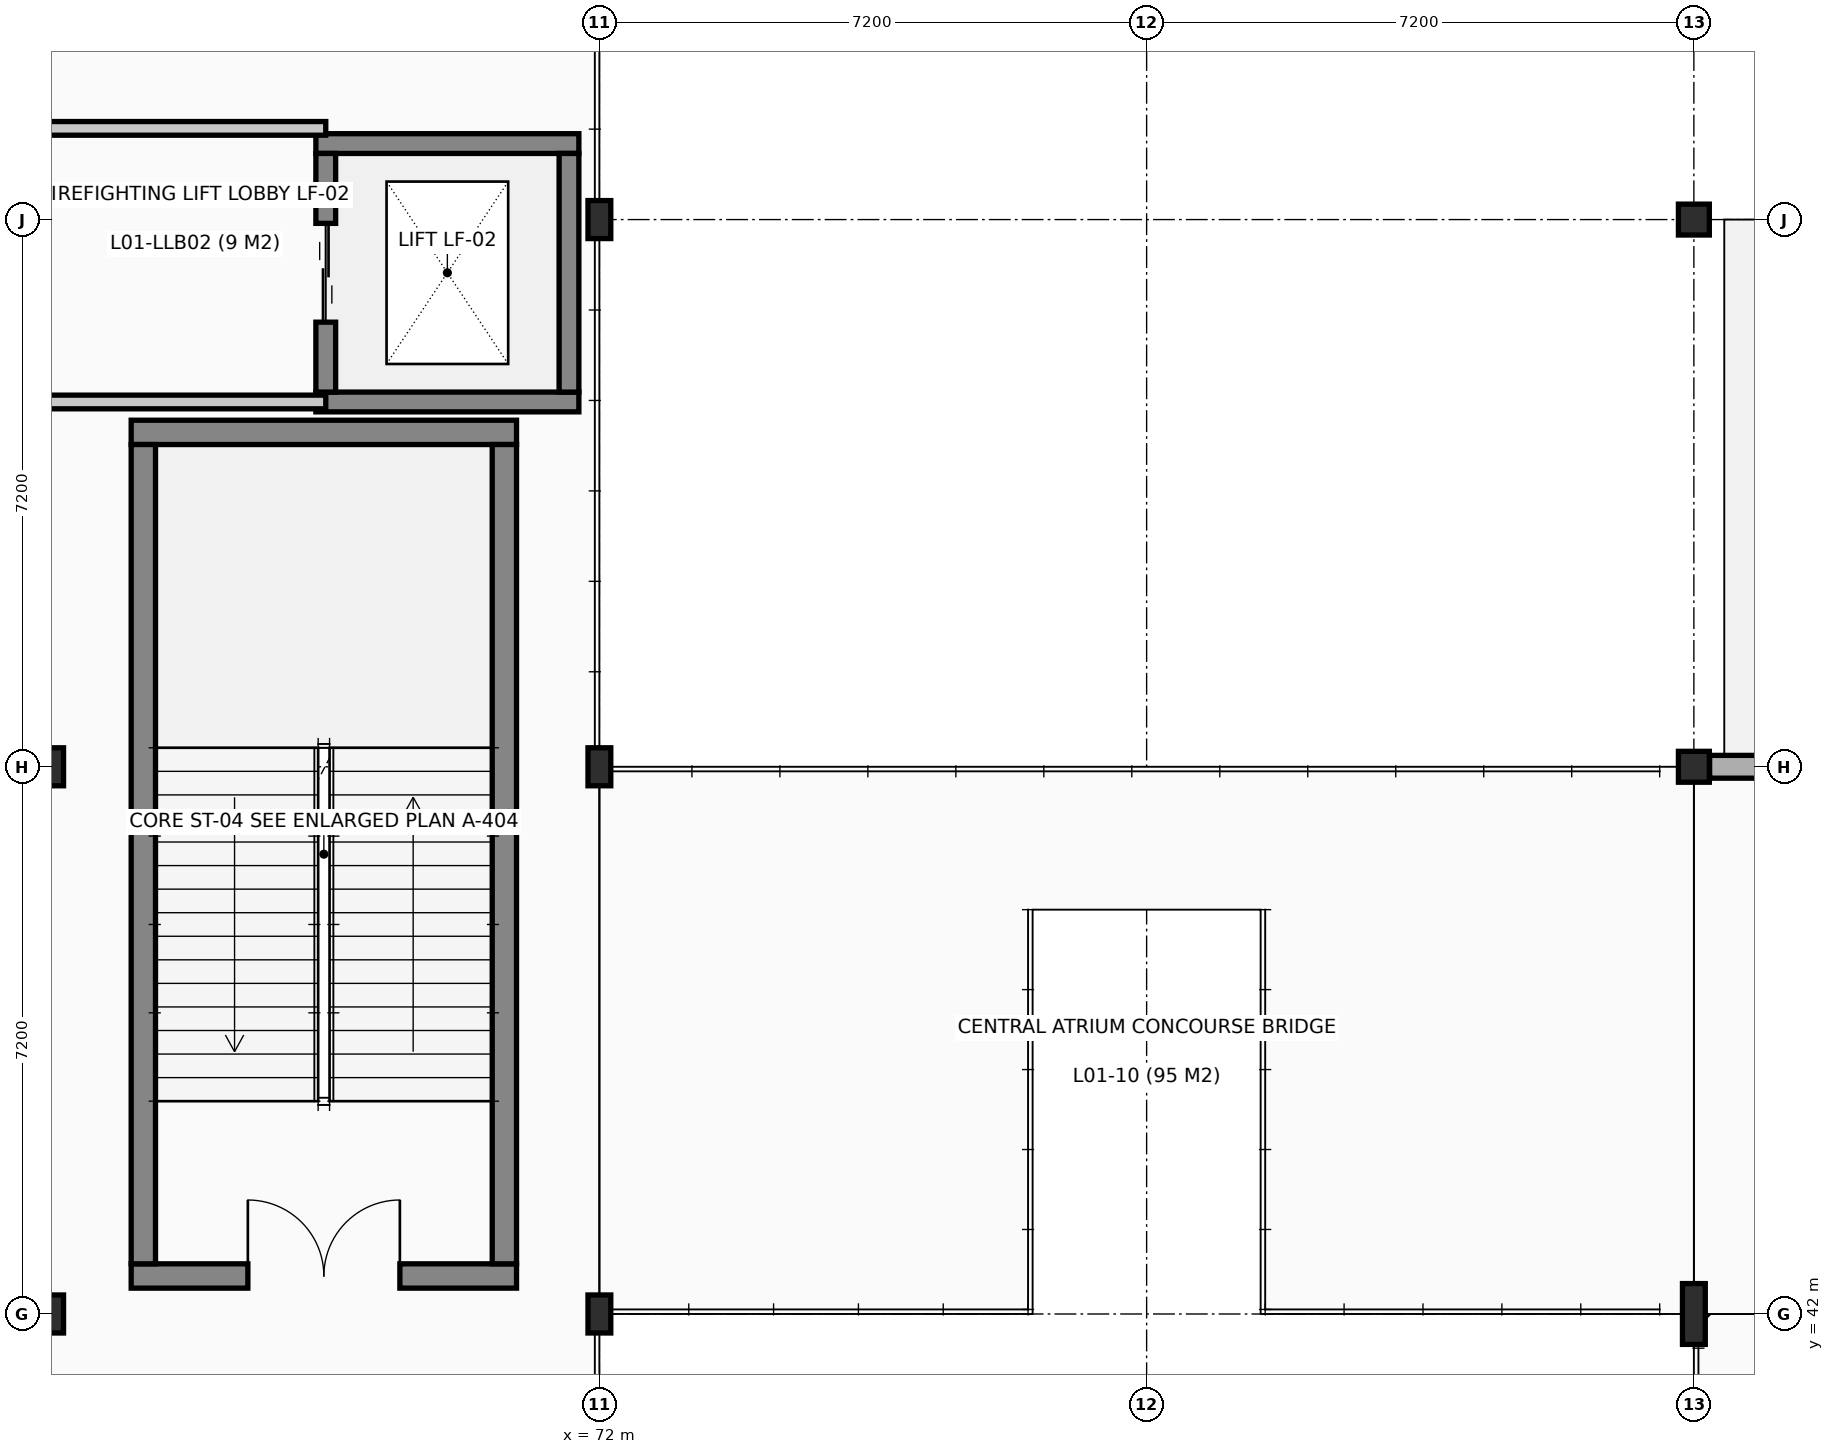
"""IFC4 building model, lengths in metres.
Left out: names, types, materials, properties, quantities, classifications, styles, units other than length and angle.
Written with IfcOpenShell. Run it as: python <this file> out.ifc"""

import sys

from ifc_helpers import new_model, si_unit, direction, frame, frame_2d, origin, origin_2d, place, context, subcontext, project, spatial, rectangle, hollow_circle, i_section, extrude, element, fill, save


model = new_model("IFC4")
c1 = context("Model", 3, precision=1e-05, world=origin(), true_north=direction((0.0, 1.0)))
c2 = subcontext(c1, "Body", "Model", "MODEL_VIEW")
j1 = project(units=[si_unit("LENGTHUNIT", "METRE"), si_unit("PLANEANGLEUNIT", "RADIAN")], contexts=[c1])
p1 = place(None, origin())
s1 = spatial("IfcSite", under=j1, at=p1, CompositionType="ELEMENT")
p2 = place(p1, origin())
s2 = spatial("IfcBuilding", under=s1, at=p2, CompositionType="ELEMENT")
p3 = place(p2, frame((0.0, 0.0, 4.8)))
s3 = spatial("IfcBuildingStorey", under=s2, at=p3, CompositionType="ELEMENT", Elevation=4.8)
for number, where, z_axis, x_axis in (
    (1, (64.8, 42.0, 0.0), (0.0, 0.0, 1.0), (1.0, 0.0, 0.0)),
    (2, (64.8, 49.2, 0.0), (0.0, 0.0, 1.0), (1.0, 0.0, 0.0)),
    (3, (72.0, 42.0, 0.0), (0.0, 0.0, 1.0), (1.0, 0.0, 0.0)),
    (4, (72.0, 49.2, 0.0), (0.0, 0.0, 1.0), (1.0, 0.0, 0.0)),
    (5, (72.0, 56.4, 0.0), (0.0, 0.0, 1.0), (1.0, 0.0, 0.0)),
):
    element("IfcColumn", number, at=place(p3, frame(where, z_axis=z_axis, x_axis=x_axis)), inside=s3, PredefinedType="COLUMN", context=c2, shape_type="SweptSolid", body=[
        extrude(i_section(OverallWidth=0.3, OverallDepth=0.5, WebThickness=0.014, FlangeThickness=0.028, at=origin_2d()), origin(), (0.0, 0.0, 1.0), 4.8),
    ])
p4 = place(p3, frame((86.4, 42.0, 0.0), z_axis=(0.0, 0.0, 1.0), x_axis=(1.0, 0.0, 0.0)))
e6 = element("IfcColumn", 6, at=p4, inside=s3, PredefinedType="COLUMN", context=c2, shape_type="SweptSolid", body=[
    extrude(i_section(OverallWidth=0.3, OverallDepth=0.8, WebThickness=0.018, FlangeThickness=0.033, at=origin_2d()), origin(), (0.0, 0.0, 1.0), 4.8),
])
for number, where, z_axis, x_axis in (
    (7, (86.4, 49.2, 0.0), (0.0, 0.0, 1.0), (1.0, 0.0, 0.0)),
    (8, (86.4, 56.4, 0.0), (0.0, 0.0, 1.0), (1.0, 0.0, 0.0)),
):
    element("IfcColumn", number, at=place(p3, frame(where, z_axis=z_axis, x_axis=x_axis)), inside=s3, PredefinedType="COLUMN", context=c2, shape_type="SweptSolid", body=[
        extrude(hollow_circle(Radius=0.203, WallThickness=0.016, at=origin_2d()), origin(), (0.0, 0.0, 1.0), 4.8),
    ])
p5 = place(p3, frame((86.607, 49.2, 0.0), z_axis=(0.0, 0.0, 1.0), x_axis=(1.0, 0.0, 0.0)))
e9 = element("IfcWall", 9, at=p5, inside=s3, PredefinedType="SOLIDWALL", context=c2, shape_type="SweptSolid", body=[
    extrude(rectangle(XDim=6.839, YDim=0.3, at=frame_2d((3.419, 0.0))), origin(), (0.0, 0.0, 1.0), 4.145),
])
p6 = place(p5, frame((2.793, 0.0, 1.0)))
e10 = element("IfcOpeningElement", 10, at=p6, cuts=e9, PredefinedType="OPENING", context=c2, shape_type="SweptSolid", body=[
    extrude(rectangle(XDim=1.2, YDim=2.1, at=frame_2d((0.6, 1.05))), frame((0.0, 0.16, 0.0), z_axis=(0.0, -1.0, 0.0), x_axis=(1.0, 0.0, 0.0)), (0.0, 0.0, 1.0), 0.32),
])
p7 = place(p3, frame((65.84, 42.5, 0.0), z_axis=(0.0, 0.0, 1.0), x_axis=(1.0, 0.0, 0.0)))
e11 = element("IfcWall", 11, at=p7, inside=s3, PredefinedType="SHEAR", context=c2, shape_type="SweptSolid", body=[
    extrude(rectangle(XDim=5.07, YDim=0.32, at=frame_2d((2.535, 0.0))), origin(), (0.0, 0.0, 1.0), 4.56),
])
p8 = place(p7, frame((1.535, 0.0, 0.0)))
e12 = element("IfcOpeningElement", 12, at=p8, cuts=e11, PredefinedType="OPENING", context=c2, shape_type="SweptSolid", body=[
    extrude(rectangle(XDim=2.0, YDim=2.15, at=frame_2d((1.0, 1.075))), frame((0.0, 0.17, 0.0), z_axis=(0.0, -1.0, 0.0), x_axis=(1.0, 0.0, 0.0)), (0.0, 0.0, 1.0), 0.34),
])
p9 = place(p3, frame((65.84, 53.6, 0.0), z_axis=(0.0, 0.0, 1.0), x_axis=(1.0, 0.0, 0.0)))
e13 = element("IfcWall", 13, at=p9, inside=s3, PredefinedType="SHEAR", context=c2, shape_type="SweptSolid", body=[
    extrude(rectangle(XDim=5.07, YDim=0.32, at=frame_2d((2.535, 0.0))), origin(), (0.0, 0.0, 1.0), 4.56),
])
for number, where, z_axis, x_axis in (
    (14, (66.0, 42.66, 0.0), (0.0, 0.0, 1.0), (0.0, 1.0, 0.0)),
    (15, (70.75, 42.66, 0.0), (0.0, 0.0, 1.0), (0.0, 1.0, 0.0)),
):
    element("IfcWall", number, at=place(p3, frame(where, z_axis=z_axis, x_axis=x_axis)), inside=s3, PredefinedType="SHEAR", context=c2, shape_type="SweptSolid", body=[
        extrude(rectangle(XDim=10.78, YDim=0.32, at=frame_2d((5.39, 0.0))), origin(), (0.0, 0.0, 1.0), 4.56),
    ])
for number, where, z_axis, x_axis in (
    (16, (68.27, 54.0, 0.0), (0.0, 0.0, 1.0), (1.0, 0.0, 0.0)),
    (17, (68.27, 57.4, 0.0), (0.0, 0.0, 1.0), (1.0, 0.0, 0.0)),
):
    element("IfcWall", number, at=place(p3, frame(where, z_axis=z_axis, x_axis=x_axis)), inside=s3, PredefinedType="SHEAR", context=c2, shape_type="SweptSolid", body=[
        extrude(rectangle(XDim=3.46, YDim=0.26, at=frame_2d((1.73, 0.0))), origin(), (0.0, 0.0, 1.0), 4.56),
    ])
p10 = place(p3, frame((68.4, 54.13, 0.0), z_axis=(0.0, 0.0, 1.0), x_axis=(0.0, 1.0, 0.0)))
e18 = element("IfcWall", 18, at=p10, inside=s3, PredefinedType="SHEAR", context=c2, shape_type="SweptSolid", body=[
    extrude(rectangle(XDim=3.14, YDim=0.26, at=frame_2d((1.57, 0.0))), origin(), (0.0, 0.0, 1.0), 4.56),
])
p11 = place(p10, frame((0.92, 0.0, 0.0)))
e19 = element("IfcOpeningElement", 19, at=p11, cuts=e18, PredefinedType="OPENING", context=c2, shape_type="SweptSolid", body=[
    extrude(rectangle(XDim=1.3, YDim=2.2, at=frame_2d((0.65, 1.1))), frame((0.0, 0.14, 0.0), z_axis=(0.0, -1.0, 0.0), x_axis=(1.0, 0.0, 0.0)), (0.0, 0.0, 1.0), 0.28),
])
p12 = place(p3, frame((71.6, 54.13, 0.0), z_axis=(0.0, 0.0, 1.0), x_axis=(0.0, 1.0, 0.0)))
e20 = element("IfcWall", 20, at=p12, inside=s3, PredefinedType="SHEAR", context=c2, shape_type="SweptSolid", body=[
    extrude(rectangle(XDim=3.14, YDim=0.26, at=frame_2d((1.57, 0.0))), origin(), (0.0, 0.0, 1.0), 4.56),
])
for number, where, z_axis, x_axis in (
    (21, (63.4, 54.0, 0.0), (0.0, 0.0, 1.0), (1.0, 0.0, 0.0)),
    (22, (63.4, 57.6, 0.0), (0.0, 0.0, 1.0), (1.0, 0.0, 0.0)),
):
    element("IfcWall", number, at=place(p3, frame(where, z_axis=z_axis, x_axis=x_axis)), inside=s3, PredefinedType="PARTITIONING", context=c2, shape_type="SweptSolid", body=[
        extrude(rectangle(XDim=5.0, YDim=0.18, at=frame_2d((2.5, 0.0))), origin(), (0.0, 0.0, 1.0), 4.545),
    ])
p13 = place(p8, origin())
e23 = element("IfcDoor", 23, at=p13, inside=s3, OperationType="DOUBLE_DOOR_SINGLE_SWING", PredefinedType="DOOR", context=c2, shape_type="SweptSolid", body=[
    extrude(rectangle(XDim=2.0, YDim=2.15, at=frame_2d((1.0, 1.075))), frame((0.0, 0.025, 0.0), z_axis=(0.0, -1.0, 0.0), x_axis=(1.0, 0.0, 0.0)), (0.0, 0.0, 1.0), 0.05),
])
fill(e12, e23)
p14 = place(p11, origin())
e24 = element("IfcDoor", 24, at=p14, inside=s3, OperationType="DOUBLE_DOOR_SLIDING", PredefinedType="DOOR", context=c2, shape_type="SweptSolid", body=[
    extrude(rectangle(XDim=1.3, YDim=2.2, at=frame_2d((0.65, 1.1))), frame((0.0, 0.025, 0.0), z_axis=(0.0, -1.0, 0.0), x_axis=(1.0, 0.0, 0.0)), (0.0, 0.0, 1.0), 0.05),
])
fill(e19, e24)
save(model, sys.argv[1])
